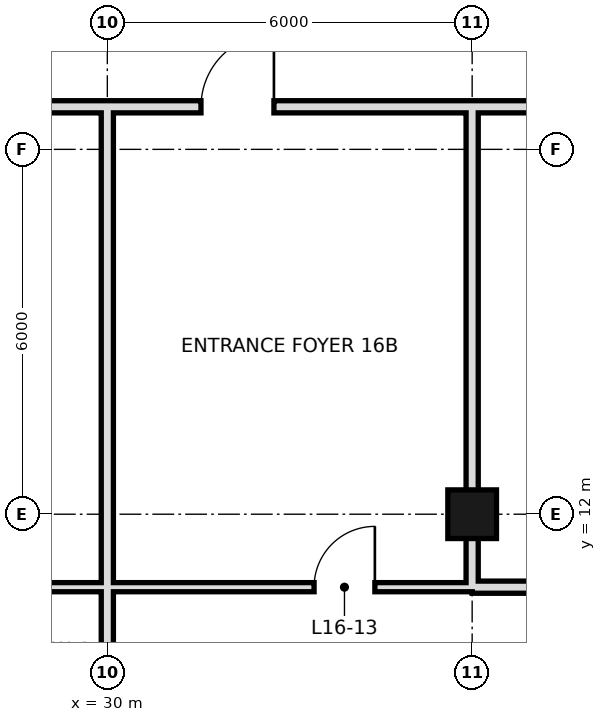
"""IFC4 building model, lengths in metres.
Left out: names, types, materials, properties, quantities, classifications, styles, units other than length and angle.
Written with IfcOpenShell. Run it as: python <this file> out.ifc"""

import sys

from ifc_helpers import new_model, si_unit, direction, frame, frame_2d, origin, origin_2d, place, context, subcontext, project, spatial, rectangle, hollow_rectangle, extrude, element, fill, save


model = new_model("IFC4")
c1 = context("Model", 3, precision=1e-05, world=origin(), true_north=direction((0.0, 1.0)))
c2 = subcontext(c1, "Body", "Model", "MODEL_VIEW")
j1 = project(units=[si_unit("LENGTHUNIT", "METRE"), si_unit("PLANEANGLEUNIT", "RADIAN")], contexts=[c1])
p1 = place(None, origin())
s1 = spatial("IfcSite", under=j1, at=p1, CompositionType="ELEMENT")
p2 = place(p1, origin())
s2 = spatial("IfcBuilding", under=s1, at=p2, CompositionType="ELEMENT")
p3 = place(p2, frame((0.0, 0.0, 78.6)))
s3 = spatial("IfcBuildingStorey", under=s2, at=p3, CompositionType="ELEMENT", Elevation=78.6)
p4 = place(p3, frame((36.0, 12.0, 0.0), z_axis=(0.0, 0.0, 1.0), x_axis=(1.0, 0.0, 0.0)))
e1 = element("IfcColumn", 1, at=p4, inside=s3, PredefinedType="COLUMN", context=c2, shape_type="SweptSolid", body=[
    extrude(hollow_rectangle(XDim=0.8, YDim=0.8, WallThickness=0.04, at=origin_2d()), origin(), (0.0, 0.0, 1.0), 3.6),
])
p5 = place(p3, frame((30.0, -0.6, 0.0), z_axis=(0.0, 0.0, 1.0), x_axis=(0.0, 1.0, 0.0)))
e2 = element("IfcWall", 2, at=p5, inside=s3, PredefinedType="SOLIDWALL", context=c2, shape_type="SweptSolid", body=[
    extrude(rectangle(XDim=19.3, YDim=0.2, at=frame_2d((9.65, 0.0))), origin(), (0.0, 0.0, 1.0), 2.72),
])
p6 = place(p3, frame((36.0, 10.8, 0.0), z_axis=(0.0, 0.0, 1.0), x_axis=(0.0, 1.0, 0.0)))
e3 = element("IfcWall", 3, at=p6, inside=s3, PredefinedType="SOLIDWALL", context=c2, shape_type="SweptSolid", body=[
    extrude(rectangle(XDim=7.9, YDim=0.2, at=frame_2d((3.95, 0.0))), origin(), (0.0, 0.0, 1.0), 2.72),
])
p7 = place(p3, frame((36.0, 10.8, 0.0), z_axis=(0.0, 0.0, 1.0), x_axis=(1.0, 0.0, 0.0)))
e4 = element("IfcWall", 4, at=p7, inside=s3, PredefinedType="SOLIDWALL", context=c2, shape_type="SweptSolid", body=[
    extrude(rectangle(XDim=5.4, YDim=0.2, at=frame_2d((2.7, 0.0))), origin(), (0.0, 0.0, 1.0), 2.72),
])
p8 = place(p7, frame((2.98, 0.0, 0.0)))
e5 = element("IfcOpeningElement", 5, at=p8, cuts=e4, PredefinedType="OPENING", context=c2, shape_type="SweptSolid", body=[
    extrude(rectangle(XDim=1.0, YDim=2.4, at=frame_2d((0.5, 1.2))), frame((0.0, 0.11, 0.0), z_axis=(0.0, -1.0, 0.0), x_axis=(1.0, 0.0, 0.0)), (0.0, 0.0, 1.0), 0.22),
])
p9 = place(p3, frame((6.6, 10.8, 0.0), z_axis=(0.0, 0.0, 1.0), x_axis=(1.0, 0.0, 0.0)))
e6 = element("IfcWall", 6, at=p9, inside=s3, PredefinedType="PARTITIONING", context=c2, shape_type="SweptSolid", body=[
    extrude(rectangle(XDim=29.4, YDim=0.15, at=frame_2d((14.7, 0.0))), origin(), (0.0, 0.0, 1.0), 3.42),
])
p10 = place(p9, frame((2.5, 0.0, 0.0)))
e7 = element("IfcOpeningElement", 7, at=p10, cuts=e6, PredefinedType="OPENING", context=c2, shape_type="SweptSolid", body=[
    extrude(rectangle(XDim=1.0, YDim=2.4, at=frame_2d((0.5, 1.2))), frame((0.0, 0.085, 0.0), z_axis=(0.0, -1.0, 0.0), x_axis=(1.0, 0.0, 0.0)), (0.0, 0.0, 1.0), 0.17),
])
p11 = place(p9, frame((7.96, 0.0, 0.0)))
e8 = element("IfcOpeningElement", 8, at=p11, cuts=e6, PredefinedType="OPENING", context=c2, shape_type="SweptSolid", body=[
    extrude(rectangle(XDim=1.0, YDim=2.4, at=frame_2d((0.5, 1.2))), frame((0.0, 0.085, 0.0), z_axis=(0.0, -1.0, 0.0), x_axis=(1.0, 0.0, 0.0)), (0.0, 0.0, 1.0), 0.17),
])
p12 = place(p9, frame((19.54, 0.0, 0.0)))
e9 = element("IfcOpeningElement", 9, at=p12, cuts=e6, PredefinedType="OPENING", context=c2, shape_type="SweptSolid", body=[
    extrude(rectangle(XDim=1.0, YDim=2.4, at=frame_2d((0.5, 1.2))), frame((0.0, 0.085, 0.0), z_axis=(0.0, -1.0, 0.0), x_axis=(1.0, 0.0, 0.0)), (0.0, 0.0, 1.0), 0.17),
])
p13 = place(p9, frame((26.8, 0.0, 0.0)))
e10 = element("IfcOpeningElement", 10, at=p13, cuts=e6, PredefinedType="OPENING", context=c2, shape_type="SweptSolid", body=[
    extrude(rectangle(XDim=1.0, YDim=2.4, at=frame_2d((0.5, 1.2))), frame((0.0, 0.085, 0.0), z_axis=(0.0, -1.0, 0.0), x_axis=(1.0, 0.0, 0.0)), (0.0, 0.0, 1.0), 0.17),
])
p14 = place(p3, frame((6.6, 18.7, 0.0), z_axis=(0.0, 0.0, 1.0), x_axis=(1.0, 0.0, 0.0)))
e11 = element("IfcWall", 11, at=p14, inside=s3, PredefinedType="SOLIDWALL", context=c2, shape_type="SweptSolid", body=[
    extrude(rectangle(XDim=29.4, YDim=0.2, at=frame_2d((14.7, 0.0))), origin(), (0.0, 0.0, 1.0), 2.72),
])
p15 = place(p14, frame((1.54, 0.0, 0.0)))
e12 = element("IfcOpeningElement", 12, at=p15, cuts=e11, PredefinedType="OPENING", context=c2, shape_type="SweptSolid", body=[
    extrude(rectangle(XDim=1.2, YDim=2.4, at=frame_2d((0.6, 1.2))), frame((0.0, 0.11, 0.0), z_axis=(0.0, -1.0, 0.0), x_axis=(1.0, 0.0, 0.0)), (0.0, 0.0, 1.0), 0.22),
])
p16 = place(p14, frame((24.94, 0.0, 0.0)))
e13 = element("IfcOpeningElement", 13, at=p16, cuts=e11, PredefinedType="OPENING", context=c2, shape_type="SweptSolid", body=[
    extrude(rectangle(XDim=1.2, YDim=2.4, at=frame_2d((0.6, 1.2))), frame((0.0, 0.11, 0.0), z_axis=(0.0, -1.0, 0.0), x_axis=(1.0, 0.0, 0.0)), (0.0, 0.0, 1.0), 0.22),
])
p17 = place(p3, frame((36.0, 18.7, 0.0), z_axis=(0.0, 0.0, 1.0), x_axis=(1.0, 0.0, 0.0)))
e14 = element("IfcWall", 14, at=p17, inside=s3, PredefinedType="SOLIDWALL", context=c2, shape_type="SweptSolid", body=[
    extrude(rectangle(XDim=5.4, YDim=0.2, at=frame_2d((2.7, 0.0))), origin(), (0.0, 0.0, 1.0), 3.42),
])
p18 = place(p13, frame((1.0, 0.0, 0.0), z_axis=(0.0, 0.0, 1.0), x_axis=(-1.0, 0.0, 0.0)))
e15 = element("IfcDoor", 15, at=p18, inside=s3, OperationType="SINGLE_SWING_LEFT", PredefinedType="DOOR", context=c2, shape_type="SweptSolid", body=[
    extrude(rectangle(XDim=1.0, YDim=2.4, at=frame_2d((0.5, 1.2))), frame((0.0, 0.025, 0.0), z_axis=(0.0, -1.0, 0.0), x_axis=(1.0, 0.0, 0.0)), (0.0, 0.0, 1.0), 0.05),
])
fill(e10, e15)
p19 = place(p16, frame((1.2, 0.0, 0.0), z_axis=(0.0, 0.0, 1.0), x_axis=(-1.0, 0.0, 0.0)))
e16 = element("IfcDoor", 16, at=p19, inside=s3, OperationType="SINGLE_SWING_LEFT", PredefinedType="DOOR", context=c2, shape_type="SweptSolid", body=[
    extrude(rectangle(XDim=1.2, YDim=2.4, at=frame_2d((0.6, 1.2))), frame((0.0, 0.025, 0.0), z_axis=(0.0, -1.0, 0.0), x_axis=(1.0, 0.0, 0.0)), (0.0, 0.0, 1.0), 0.05),
])
fill(e13, e16)
save(model, sys.argv[1])
